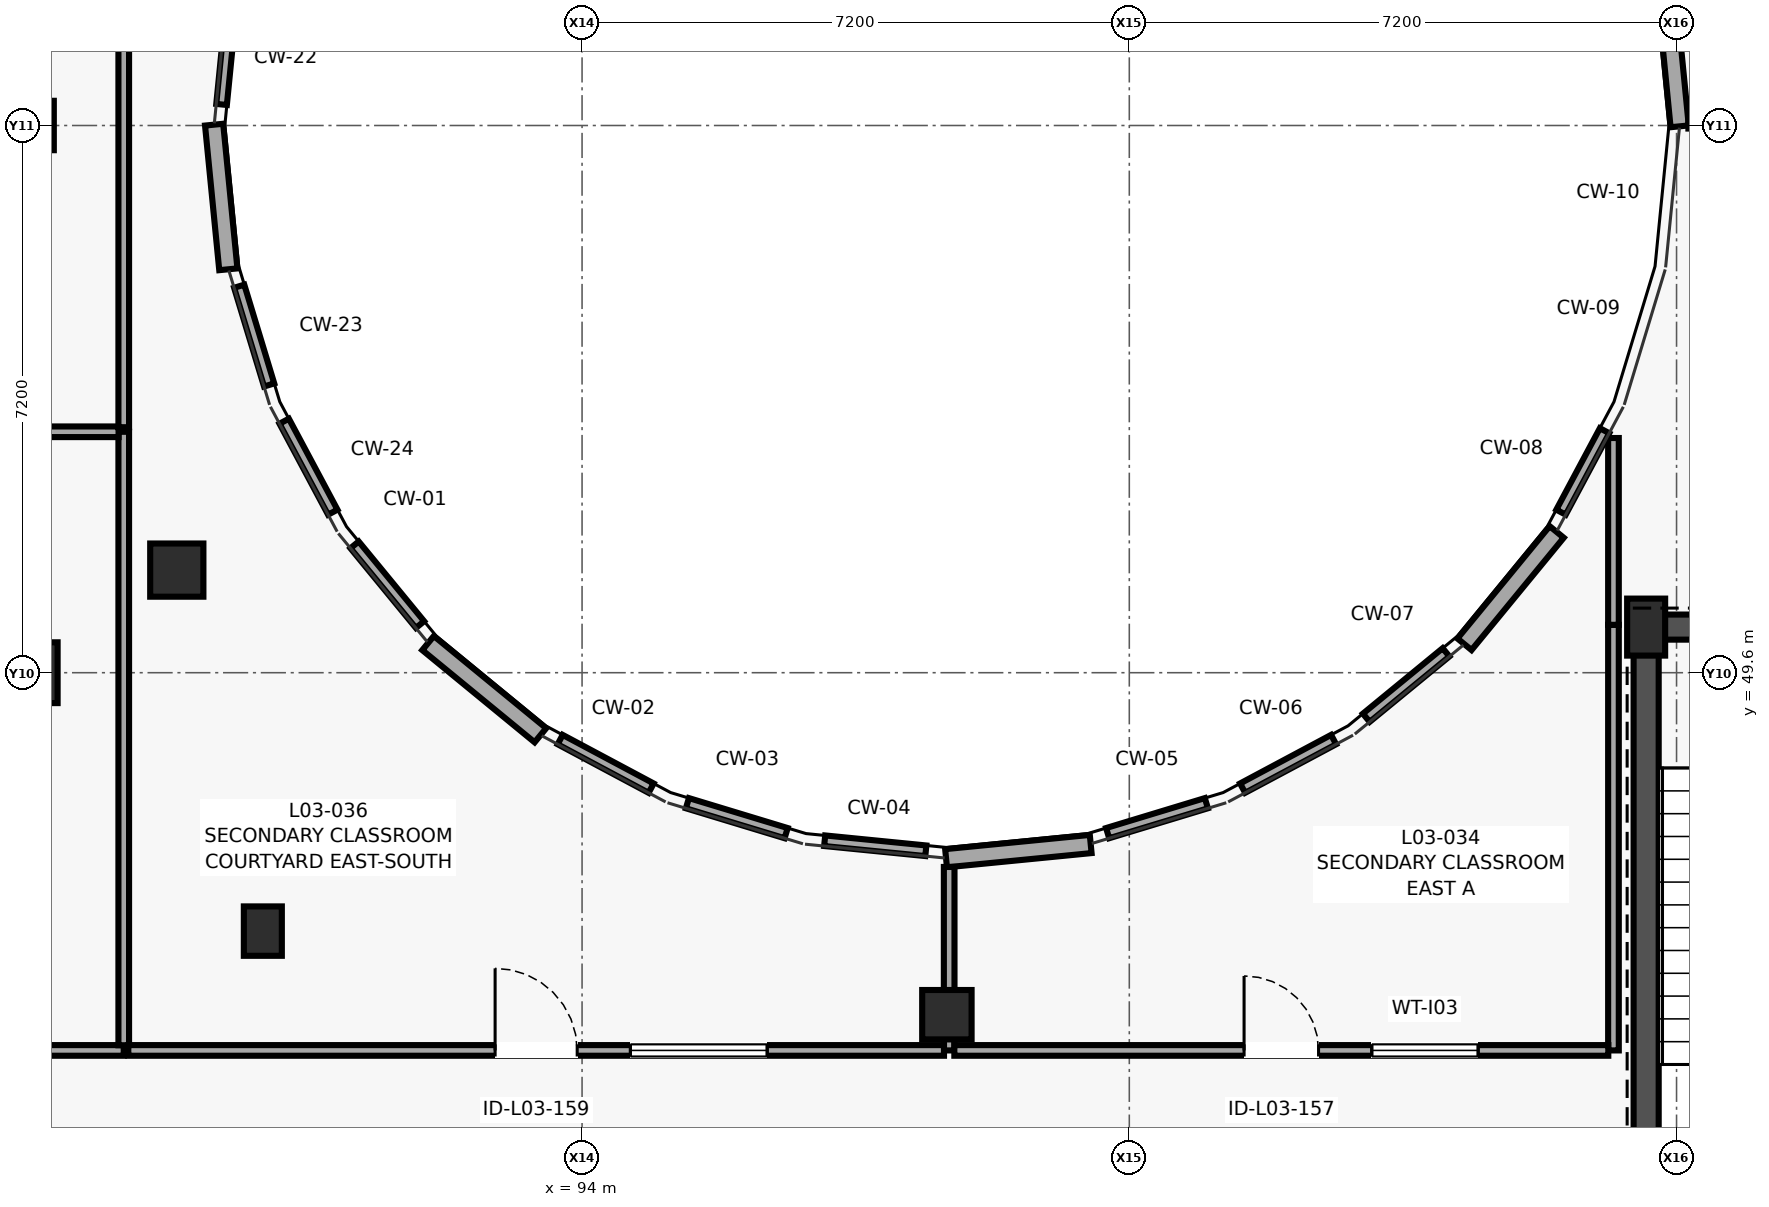
"""IFC4 building model, lengths in metres.
Left out: names, types, materials, properties, quantities, classifications, styles, units other than length and angle.
Written with IfcOpenShell. Run it as: python <this file> out.ifc"""

import sys

from ifc_helpers import new_model, si_unit, direction, frame, frame_2d, origin, origin_2d, place, context, subcontext, project, spatial, rectangle, circle, extrude, element, fill, save


model = new_model("IFC4")
c1 = context("Model", 3, precision=1e-05, world=origin(), true_north=direction((0.0, 1.0)))
c2 = subcontext(c1, "Body", "Model", "MODEL_VIEW")
j1 = project(units=[si_unit("LENGTHUNIT", "METRE"), si_unit("PLANEANGLEUNIT", "RADIAN")], contexts=[c1])
p1 = place(None, origin())
s1 = spatial("IfcSite", under=j1, at=p1, CompositionType="ELEMENT")
p2 = place(p1, origin())
s2 = spatial("IfcBuilding", under=s1, at=p2, CompositionType="ELEMENT")
p3 = place(p2, frame((0.0, 0.0, 12.2)))
s3 = spatial("IfcBuildingStorey", under=s2, at=p3, CompositionType="ELEMENT", Elevation=12.2)
p4 = place(p3, frame((86.8, 49.6, 0.0), z_axis=(0.0, 0.0, 1.0), x_axis=(1.0, 0.0, 0.0)))
e1 = element("IfcColumn", 1, at=p4, inside=s3, PredefinedType="COLUMN", context=c2, shape_type="SweptSolid", body=[
    extrude(rectangle(XDim=0.6, YDim=0.8, at=origin_2d()), origin(), (0.0, 0.0, 1.0), 4.0),
])
p5 = place(p3, frame((86.8, 56.8, 0.0), z_axis=(0.0, 0.0, 1.0), x_axis=(1.0, 0.0, 0.0)))
e2 = element("IfcColumn", 2, at=p5, inside=s3, PredefinedType="COLUMN", context=c2, shape_type="SweptSolid", body=[
    extrude(rectangle(XDim=0.5, YDim=0.65, at=origin_2d()), origin(), (0.0, 0.0, 1.0), 4.0),
])
p6 = place(p3, frame((88.668, 50.95, 0.0), z_axis=(0.0, 0.0, 1.0), x_axis=(1.0, 0.0, 0.0)))
e3 = element("IfcColumn", 3, at=p6, inside=s3, PredefinedType="COLUMN", context=c2, shape_type="SweptSolid", body=[
    extrude(circle(Radius=0.35, at=origin_2d()), origin(), (0.0, 0.0, 1.0), 4.0),
])
p7 = place(p3, frame((89.8, 46.2, 0.0), z_axis=(0.0, 0.0, 1.0), x_axis=(1.0, 0.0, 0.0)))
e4 = element("IfcColumn", 4, at=p7, inside=s3, PredefinedType="COLUMN", context=c2, shape_type="SweptSolid", body=[
    extrude(rectangle(XDim=0.5, YDim=0.65, at=origin_2d()), origin(), (0.0, 0.0, 1.0), 4.0),
])
p8 = place(p3, frame((98.8, 45.1, 0.0), z_axis=(0.0, 0.0, 1.0), x_axis=(1.0, 0.0, 0.0)))
e5 = element("IfcColumn", 5, at=p8, inside=s3, PredefinedType="COLUMN", context=c2, shape_type="SweptSolid", body=[
    extrude(circle(Radius=0.325, at=origin_2d()), origin(), (0.0, 0.0, 1.0), 4.0),
])
p9 = place(p3, frame((108.0, 50.2, 0.0), z_axis=(0.0, 0.0, 1.0), x_axis=(1.0, 0.0, 0.0)))
e6 = element("IfcColumn", 6, at=p9, inside=s3, PredefinedType="COLUMN", context=c2, shape_type="SweptSolid", body=[
    extrude(rectangle(XDim=0.5, YDim=0.75, at=origin_2d()), origin(), (0.0, 0.0, 1.0), 4.0),
])
p10 = place(p3, frame((89.159, 56.811, 0.0), z_axis=(0.0, 0.0, 1.0), x_axis=(0.097797060374, -0.995206378086, 0.0)))
e7 = element("IfcWall", 7, at=p10, inside=s3, PredefinedType="SOLIDWALL", context=c2, shape_type="SweptSolid", body=[
    extrude(rectangle(XDim=1.912, YDim=0.24, at=frame_2d((0.956, 0.0))), origin(), (0.0, 0.0, 1.0), 3.78),
])
p11 = place(p3, frame((91.974, 49.99, 0.0), z_axis=(0.0, 0.0, 1.0), x_axis=(0.772983444074, -0.634426193649, 0.0)))
e8 = element("IfcWall", 8, at=p11, inside=s3, PredefinedType="SOLIDWALL", context=c2, shape_type="SweptSolid", body=[
    extrude(rectangle(XDim=1.912, YDim=0.24, at=frame_2d((0.956, 0.0))), origin(), (0.0, 0.0, 1.0), 3.78),
])
p12 = place(p3, frame((98.789, 47.159, 0.0), z_axis=(0.0, 0.0, 1.0), x_axis=(0.99520515676, 0.097809488078, 0.0)))
e9 = element("IfcWall", 9, at=p12, inside=s3, PredefinedType="SOLIDWALL", context=c2, shape_type="SweptSolid", body=[
    extrude(rectangle(XDim=1.912, YDim=0.24, at=frame_2d((0.956, 0.0))), origin(), (0.0, 0.0, 1.0), 3.78),
])
p13 = place(p3, frame((105.61, 49.974, 0.0), z_axis=(0.0, 0.0, 1.0), x_axis=(0.634426193649, 0.772983444074, 0.0)))
e10 = element("IfcWall", 10, at=p13, inside=s3, PredefinedType="SOLIDWALL", context=c2, shape_type="SweptSolid", body=[
    extrude(rectangle(XDim=1.912, YDim=0.24, at=frame_2d((0.956, 0.0))), origin(), (0.0, 0.0, 1.0), 3.78),
])
p14 = place(p3, frame((108.441, 56.789, 0.0), z_axis=(0.0, 0.0, 1.0), x_axis=(-0.097809488078, 0.99520515676, 0.0)))
e11 = element("IfcWall", 11, at=p14, inside=s3, PredefinedType="SOLIDWALL", context=c2, shape_type="SweptSolid", body=[
    extrude(rectangle(XDim=1.912, YDim=0.24, at=frame_2d((0.956, 0.0))), origin(), (0.0, 0.0, 1.0), 3.78),
])
p15 = place(p3, frame((107.835, 50.2, 0.0), z_axis=(0.0, 0.0, 1.0), x_axis=(1.0, 0.0, 0.0)))
e12 = element("IfcWall", 12, at=p15, inside=s3, PredefinedType="SHEAR", context=c2, shape_type="SweptSolid", body=[
    extrude(rectangle(XDim=7.53, YDim=0.33, at=frame_2d((3.765, 0.0))), origin(), (0.0, 0.0, 1.0), 3.78),
])
p16 = place(p15, frame((5.015, 0.0, 0.0)))
e13 = element("IfcOpeningElement", 13, at=p16, cuts=e12, PredefinedType="OPENING", context=c2, shape_type="SweptSolid", body=[
    extrude(rectangle(XDim=1.05, YDim=2.15, at=frame_2d((0.525, 1.075))), frame((0.0, 0.175, 0.0), z_axis=(0.0, -1.0, 0.0), x_axis=(1.0, 0.0, 0.0)), (0.0, 0.0, 1.0), 0.35),
])
p17 = place(p15, frame((1.565, 0.0, 0.0)))
e14 = element("IfcOpeningElement", 14, at=p17, cuts=e12, PredefinedType="OPENING", context=c2, shape_type="SweptSolid", body=[
    extrude(rectangle(XDim=1.1, YDim=2.15, at=frame_2d((0.55, 1.075))), frame((0.0, 0.175, 0.0), z_axis=(0.0, -1.0, 0.0), x_axis=(1.0, 0.0, 0.0)), (0.0, 0.0, 1.0), 0.35),
])
p18 = place(p3, frame((108.0, 42.565, 0.0), z_axis=(0.0, 0.0, 1.0), x_axis=(0.0, 1.0, 0.0)))
e15 = element("IfcWall", 15, at=p18, inside=s3, PredefinedType="SHEAR", context=c2, shape_type="SweptSolid", body=[
    extrude(rectangle(XDim=7.47, YDim=0.33, at=frame_2d((3.735, 0.0))), origin(), (0.0, 0.0, 1.0), 3.78),
])
p19 = place(p3, frame((79.598, 44.63, 0.0), z_axis=(0.0, 0.0, 1.0), x_axis=(1.0, 0.0, 0.0)))
e16 = element("IfcWall", 16, at=p19, inside=s3, PredefinedType="PARTITIONING", context=c2, shape_type="SweptSolid", body=[
    extrude(rectangle(XDim=8.372, YDim=0.14, at=frame_2d((4.186, 0.0))), origin(), (0.0, 0.0, 1.0), 3.755),
])
p20 = place(p3, frame((87.97, 44.698, 0.0), z_axis=(0.0, 0.0, 1.0), x_axis=(0.0, 1.0, 0.0)))
e17 = element("IfcWall", 17, at=p20, inside=s3, PredefinedType="PARTITIONING", context=c2, shape_type="SweptSolid", body=[
    extrude(rectangle(XDim=8.072, YDim=0.14, at=frame_2d((4.036, 0.0))), origin(), (0.0, 0.0, 1.0), 3.755),
])
p21 = place(p3, frame((87.902, 52.77, 0.0), z_axis=(0.0, 0.0, 1.0), x_axis=(-1.0, 0.0, 0.0)))
e18 = element("IfcWall", 18, at=p21, inside=s3, PredefinedType="PARTITIONING", context=c2, shape_type="SweptSolid", body=[
    extrude(rectangle(XDim=8.304, YDim=0.14, at=frame_2d((4.152, 0.0))), origin(), (0.0, 0.0, 1.0), 3.755),
])
p22 = place(p3, frame((87.97, 52.83, 0.0), z_axis=(0.0, 0.0, 1.0), x_axis=(0.0, 1.0, 0.0)))
e19 = element("IfcWall", 19, at=p22, inside=s3, PredefinedType="PARTITIONING", context=c2, shape_type="SweptSolid", body=[
    extrude(rectangle(XDim=7.872, YDim=0.14, at=frame_2d((3.936, 0.0))), origin(), (0.0, 0.0, 1.0), 3.755),
])
p23 = place(p3, frame((107.57, 44.63, 0.0), z_axis=(0.0, 0.0, 1.0), x_axis=(0.0, 1.0, 0.0)))
e20 = element("IfcWall", 20, at=p23, inside=s3, PredefinedType="PARTITIONING", context=c2, shape_type="SweptSolid", body=[
    extrude(rectangle(XDim=5.6, YDim=0.14, at=frame_2d((2.8, 0.0))), origin(), (0.0, 0.0, 1.0), 3.755),
])
p24 = place(p3, frame((107.57, 50.23, 0.0), z_axis=(0.0, 0.0, 1.0), x_axis=(0.0, 1.0, 0.0)))
e21 = element("IfcWall", 21, at=p24, inside=s3, PredefinedType="PARTITIONING", context=c2, shape_type="SweptSolid", body=[
    extrude(rectangle(XDim=2.458, YDim=0.14, at=frame_2d((1.229, 0.0))), origin(), (0.0, 0.0, 1.0), 3.755),
])
p25 = place(p3, frame((107.453, 52.784, 0.0), z_axis=(0.0, 0.0, 1.0), x_axis=(-0.471390738411, -0.881924470542, 0.0)))
e22 = element("IfcWall", 22, at=p25, inside=s3, PredefinedType="PARTITIONING", context=c2, shape_type="SweptSolid", body=[
    extrude(rectangle(XDim=1.216, YDim=0.14, at=frame_2d((0.608, 0.0))), origin(), (0.0, 0.0, 1.0), 3.755),
])
for number, where, z_axis, x_axis in (
    (23, (105.367, 49.868, 0.0), (0.0, 0.0, 1.0), (-0.773, -0.634, 0.0)),
    (24, (103.888, 48.72, 0.0), (0.0, 0.0, 1.0), (-0.882, -0.471, 0.0)),
):
    element("IfcWall", number, at=place(p3, frame(where, z_axis=z_axis, x_axis=x_axis)), inside=s3, PredefinedType="PARTITIONING", context=c2, shape_type="SweptSolid", body=[
        extrude(rectangle(XDim=1.357, YDim=0.14, at=frame_2d((0.678, 0.0))), origin(), (0.0, 0.0, 1.0), 3.755),
    ])
p26 = place(p3, frame((102.214, 47.883, 0.0), z_axis=(0.0, 0.0, 1.0), x_axis=(-0.956945716193, -0.290266939661, 0.0)))
e25 = element("IfcWall", 25, at=p26, inside=s3, PredefinedType="PARTITIONING", context=c2, shape_type="SweptSolid", body=[
    extrude(rectangle(XDim=1.357, YDim=0.14, at=frame_2d((0.679, 0.0))), origin(), (0.0, 0.0, 1.0), 3.755),
])
p27 = place(p3, frame((98.83, 47.044, 0.0), z_axis=(0.0, 0.0, 1.0), x_axis=(0.0, -1.0, 0.0)))
e26 = element("IfcWall", 26, at=p27, inside=s3, PredefinedType="PARTITIONING", context=c2, shape_type="SweptSolid", body=[
    extrude(rectangle(XDim=2.414, YDim=0.14, at=frame_2d((1.207, 0.0))), origin(), (0.0, 0.0, 1.0), 3.755),
])
p28 = place(p3, frame((98.898, 44.63, 0.0), z_axis=(0.0, 0.0, 1.0), x_axis=(1.0, 0.0, 0.0)))
e27 = element("IfcWall", 27, at=p28, inside=s3, PredefinedType="PARTITIONING", context=c2, shape_type="SweptSolid", body=[
    extrude(rectangle(XDim=8.604, YDim=0.14, at=frame_2d((4.302, 0.0))), origin(), (0.0, 0.0, 1.0), 3.755),
])
p29 = place(p28, frame((3.812, 0.0, 0.0)))
e28 = element("IfcOpeningElement", 28, at=p29, cuts=e27, PredefinedType="OPENING", context=c2, shape_type="SweptSolid", body=[
    extrude(rectangle(XDim=0.98, YDim=2.12, at=frame_2d((0.49, 1.06))), frame((0.0, 0.08, 0.0), z_axis=(0.0, -1.0, 0.0), x_axis=(1.0, 0.0, 0.0)), (0.0, 0.0, 1.0), 0.16),
])
p30 = place(p28, frame((5.492, 0.0, 1.05)))
e29 = element("IfcOpeningElement", 29, at=p30, cuts=e27, PredefinedType="OPENING", context=c2, shape_type="SweptSolid", body=[
    extrude(rectangle(XDim=1.4, YDim=1.05, at=frame_2d((0.7, 0.525))), frame((0.0, 0.08, 0.0), z_axis=(0.0, -1.0, 0.0), x_axis=(1.0, 0.0, 0.0)), (0.0, 0.0, 1.0), 0.16),
])
p31 = place(p3, frame((108.556, 56.83, 0.0), z_axis=(0.0, 0.0, 1.0), x_axis=(1.0, 0.0, 0.0)))
e30 = element("IfcWall", 30, at=p31, inside=s3, PredefinedType="PARTITIONING", context=c2, shape_type="SweptSolid", body=[
    extrude(rectangle(XDim=4.414, YDim=0.14, at=frame_2d((2.207, 0.0))), origin(), (0.0, 0.0, 1.0), 3.755),
])
for number, where, z_axis, x_axis in (
    (31, (91.868, 50.233, 0.0), (0.0, 0.0, 1.0), (-0.634, 0.773, 0.0)),
    (32, (90.72, 51.712, 0.0), (0.0, 0.0, 1.0), (-0.471, 0.882, 0.0)),
):
    element("IfcWall", number, at=place(p3, frame(where, z_axis=z_axis, x_axis=x_axis)), inside=s3, PredefinedType="PARTITIONING", context=c2, shape_type="SweptSolid", body=[
        extrude(rectangle(XDim=1.357, YDim=0.14, at=frame_2d((0.678, 0.0))), origin(), (0.0, 0.0, 1.0), 3.755),
    ])
p32 = place(p3, frame((89.883, 53.386, 0.0), z_axis=(0.0, 0.0, 1.0), x_axis=(-0.290266939661, 0.956945716193, 0.0)))
e33 = element("IfcWall", 33, at=p32, inside=s3, PredefinedType="PARTITIONING", context=c2, shape_type="SweptSolid", body=[
    extrude(rectangle(XDim=1.357, YDim=0.14, at=frame_2d((0.679, 0.0))), origin(), (0.0, 0.0, 1.0), 3.755),
])
p33 = place(p3, frame((88.03, 44.63, 0.0), z_axis=(0.0, 0.0, 1.0), x_axis=(1.0, 0.0, 0.0)))
e34 = element("IfcWall", 34, at=p33, inside=s3, PredefinedType="PARTITIONING", context=c2, shape_type="SweptSolid", body=[
    extrude(rectangle(XDim=10.732, YDim=0.14, at=frame_2d((5.366, 0.0))), origin(), (0.0, 0.0, 1.0), 3.755),
])
p34 = place(p33, frame((4.826, 0.0, 0.0)))
e35 = element("IfcOpeningElement", 35, at=p34, cuts=e34, PredefinedType="OPENING", context=c2, shape_type="SweptSolid", body=[
    extrude(rectangle(XDim=1.08, YDim=2.16, at=frame_2d((0.54, 1.08))), frame((0.0, 0.08, 0.0), z_axis=(0.0, -1.0, 0.0), x_axis=(1.0, 0.0, 0.0)), (0.0, 0.0, 1.0), 0.16),
])
p35 = place(p33, frame((6.606, 0.0, 1.05)))
e36 = element("IfcOpeningElement", 36, at=p35, cuts=e34, PredefinedType="OPENING", context=c2, shape_type="SweptSolid", body=[
    extrude(rectangle(XDim=1.8, YDim=1.2, at=frame_2d((0.9, 0.6))), frame((0.0, 0.08, 0.0), z_axis=(0.0, -1.0, 0.0), x_axis=(1.0, 0.0, 0.0)), (0.0, 0.0, 1.0), 0.16),
])
p36 = place(p3, frame((98.523, 47.257, 0.0), z_axis=(0.0, 0.0, 1.0), x_axis=(-0.99513072014, 0.098563937798, 0.0)))
e37 = element("IfcWall", 37, at=p36, inside=s3, PredefinedType="PARTITIONING", context=c2, shape_type="SweptSolid", body=[
    extrude(rectangle(XDim=1.338, YDim=0.14, at=frame_2d((0.669, 0.0))), origin(), (0.0, 0.0, 1.0), 3.755),
])
p37 = place(p3, frame((96.685, 47.489, 0.0), z_axis=(0.0, 0.0, 1.0), x_axis=(-0.956945716193, 0.290266939661, 0.0)))
e38 = element("IfcWall", 38, at=p37, inside=s3, PredefinedType="PARTITIONING", context=c2, shape_type="SweptSolid", body=[
    extrude(rectangle(XDim=1.357, YDim=0.14, at=frame_2d((0.679, 0.0))), origin(), (0.0, 0.0, 1.0), 3.755),
])
p38 = place(p3, frame((94.909, 48.081, 0.0), z_axis=(0.0, 0.0, 1.0), x_axis=(-0.882198489785, 0.470877717269, 0.0)))
e39 = element("IfcWall", 39, at=p38, inside=s3, PredefinedType="PARTITIONING", context=c2, shape_type="SweptSolid", body=[
    extrude(rectangle(XDim=1.357, YDim=0.14, at=frame_2d((0.678, 0.0))), origin(), (0.0, 0.0, 1.0), 3.755),
])
p39 = place(p3, frame((89.257, 57.077, 0.0), z_axis=(0.0, 0.0, 1.0), x_axis=(0.098563937798, 0.99513072014, 0.0)))
e40 = element("IfcWall", 40, at=p39, inside=s3, PredefinedType="PARTITIONING", context=c2, shape_type="SweptSolid", body=[
    extrude(rectangle(XDim=1.338, YDim=0.14, at=frame_2d((0.669, 0.0))), origin(), (0.0, 0.0, 1.0), 3.755),
])
p40 = place(p29, origin())
e41 = element("IfcDoor", 41, at=p40, inside=s3, OperationType="SINGLE_SWING_LEFT", PredefinedType="DOOR", context=c2, shape_type="SweptSolid", body=[
    extrude(rectangle(XDim=0.98, YDim=2.12, at=frame_2d((0.49, 1.06))), frame((0.0, 0.025, 0.0), z_axis=(0.0, -1.0, 0.0), x_axis=(1.0, 0.0, 0.0)), (0.0, 0.0, 1.0), 0.05),
])
fill(e28, e41)
p41 = place(p30, origin())
e42 = element("IfcWindow", 42, at=p41, inside=s3, PartitioningType="SINGLE_PANEL", PredefinedType="WINDOW", context=c2, shape_type="SweptSolid", body=[
    extrude(rectangle(XDim=1.4, YDim=1.05, at=frame_2d((0.7, 0.525))), frame((0.0, 0.03, 0.0), z_axis=(0.0, -1.0, 0.0), x_axis=(1.0, 0.0, 0.0)), (0.0, 0.0, 1.0), 0.06),
])
fill(e29, e42)
p42 = place(p34, origin())
e43 = element("IfcDoor", 43, at=p42, inside=s3, OperationType="SINGLE_SWING_LEFT", PredefinedType="DOOR", context=c2, shape_type="SweptSolid", body=[
    extrude(rectangle(XDim=1.08, YDim=2.16, at=frame_2d((0.54, 1.08))), frame((0.0, 0.025, 0.0), z_axis=(0.0, -1.0, 0.0), x_axis=(1.0, 0.0, 0.0)), (0.0, 0.0, 1.0), 0.05),
])
fill(e35, e43)
p43 = place(p35, origin())
e44 = element("IfcWindow", 44, at=p43, inside=s3, PartitioningType="SINGLE_PANEL", PredefinedType="WINDOW", context=c2, shape_type="SweptSolid", body=[
    extrude(rectangle(XDim=1.8, YDim=1.2, at=frame_2d((0.9, 0.6))), frame((0.0, 0.03, 0.0), z_axis=(0.0, -1.0, 0.0), x_axis=(1.0, 0.0, 0.0)), (0.0, 0.0, 1.0), 0.06),
])
fill(e36, e44)
save(model, sys.argv[1])
